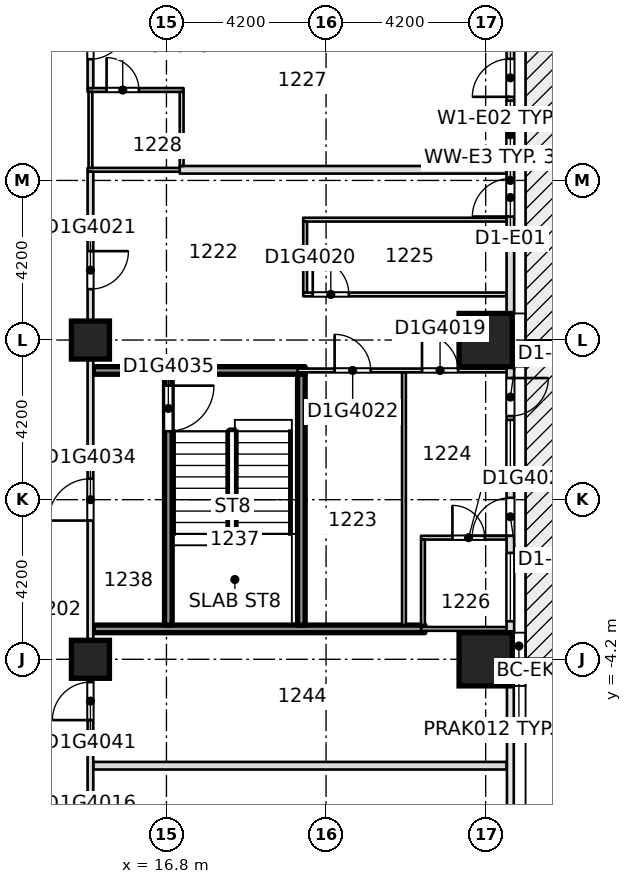
"""IFC4 building model, lengths in metres.
Left out: names, types, materials, properties, quantities, classifications, styles, units other than length and angle.
Written with IfcOpenShell. Run it as: python <this file> out.ifc"""

import sys

from ifc_helpers import new_model, si_unit, direction, frame, frame_2d, origin, origin_2d, place, context, subcontext, project, spatial, rectangle, extrude, element, fill, save


model = new_model("IFC4")
c1 = context("Model", 3, precision=1e-05, world=origin(), true_north=direction((0.0, 1.0)))
c2 = subcontext(c1, "Body", "Model", "MODEL_VIEW")
j1 = project(units=[si_unit("LENGTHUNIT", "METRE"), si_unit("PLANEANGLEUNIT", "RADIAN")], contexts=[c1])
p1 = place(None, origin())
s1 = spatial("IfcSite", under=j1, at=p1, CompositionType="ELEMENT")
p2 = place(p1, origin())
s2 = spatial("IfcBuilding", under=s1, at=p2, CompositionType="ELEMENT")
p3 = place(p2, frame((0.0, 0.0, 55.2)))
s3 = spatial("IfcBuildingStorey", under=s2, at=p3, CompositionType="ELEMENT", Elevation=55.2)
for number, where, z_axis, x_axis in (
    (1, (25.2, -4.2, -0.32), (0.0, 0.0, 1.0), (1.0, 0.0, 0.0)),
    (2, (25.2, 4.2, -0.32), (0.0, 0.0, 1.0), (1.0, 0.0, 0.0)),
):
    element("IfcColumn", number, at=place(p3, frame(where, z_axis=z_axis, x_axis=x_axis)), inside=s3, PredefinedType="COLUMN", context=c2, shape_type="SweptSolid", body=[
        extrude(rectangle(XDim=1.4, YDim=1.4, at=origin_2d()), origin(), (0.0, 0.0, 1.0), 3.45),
    ])
for number, where, z_axis, x_axis in (
    (3, (14.8, -4.2, -0.32), (0.0, 0.0, 1.0), (1.0, 0.0, 0.0)),
    (4, (14.8, 4.2, -0.32), (0.0, 0.0, 1.0), (1.0, 0.0, 0.0)),
):
    element("IfcColumn", number, at=place(p3, frame(where, z_axis=z_axis, x_axis=x_axis)), inside=s3, PredefinedType="COLUMN", context=c2, shape_type="SweptSolid", body=[
        extrude(rectangle(XDim=1.0, YDim=1.0, at=origin_2d()), origin(), (0.0, 0.0, 1.0), 3.45),
    ])
p4 = place(p3, frame((14.875, -7.0, 0.0), z_axis=(0.0, 0.0, 1.0), x_axis=(1.0, 0.0, 0.0)))
e5 = element("IfcWall", 5, at=p4, inside=s3, PredefinedType="PARTITIONING", context=c2, shape_type="SweptSolid", body=[
    extrude(rectangle(XDim=10.875, YDim=0.2, at=frame_2d((5.438, 0.0))), origin(), (0.0, 0.0, 1.0), 3.13),
])
p5 = place(p3, frame((14.875, -3.4, 0.0), z_axis=(0.0, 0.0, 1.0), x_axis=(1.0, 0.0, 0.0)))
e6 = element("IfcWall", 6, at=p5, inside=s3, PredefinedType="SOLIDWALL", context=c2, shape_type="SweptSolid", body=[
    extrude(rectangle(XDim=8.725, YDim=0.2, at=frame_2d((4.363, 0.0))), origin(), (0.0, 0.0, 1.0), 3.13),
])
p6 = place(p3, frame((23.5, -3.4, 0.0), z_axis=(0.0, 0.0, 1.0), x_axis=(1.0, 0.0, 0.0)))
e7 = element("IfcWall", 7, at=p6, inside=s3, PredefinedType="PARTITIONING", context=c2, shape_type="SweptSolid", body=[
    extrude(rectangle(XDim=2.25, YDim=0.1, at=frame_2d((1.125, 0.0))), origin(), (0.0, 0.0, 1.0), 3.13),
])
p7 = place(p3, frame((23.5, -1.0, 0.0), z_axis=(0.0, 0.0, 1.0), x_axis=(1.0, 0.0, 0.0)))
e8 = element("IfcWall", 8, at=p7, inside=s3, PredefinedType="PARTITIONING", context=c2, shape_type="SweptSolid", body=[
    extrude(rectangle(XDim=2.25, YDim=0.1, at=frame_2d((1.125, 0.0))), origin(), (0.0, 0.0, 1.0), 3.13),
])
p8 = place(p7, frame((0.825, 0.0, 0.0)))
e9 = element("IfcOpeningElement", 9, at=p8, cuts=e8, PredefinedType="OPENING", context=c2, shape_type="SweptSolid", body=[
    extrude(rectangle(XDim=0.85, YDim=2.1, at=frame_2d((0.425, 1.05))), frame((0.0, 0.06, 0.0), z_axis=(0.0, -1.0, 0.0), x_axis=(1.0, 0.0, 0.0)), (0.0, 0.0, 1.0), 0.12),
])
p9 = place(p3, frame((14.875, 3.4, 0.0), z_axis=(0.0, 0.0, 1.0), x_axis=(1.0, 0.0, 0.0)))
e10 = element("IfcWall", 10, at=p9, inside=s3, PredefinedType="SOLIDWALL", context=c2, shape_type="SweptSolid", body=[
    extrude(rectangle(XDim=5.575, YDim=0.2, at=frame_2d((2.788, 0.0))), origin(), (0.0, 0.0, 1.0), 3.13),
])
p10 = place(p3, frame((20.25, 3.4, 0.0), z_axis=(0.0, 0.0, 1.0), x_axis=(1.0, 0.0, 0.0)))
e11 = element("IfcWall", 11, at=p10, inside=s3, PredefinedType="PARTITIONING", context=c2, shape_type="SweptSolid", body=[
    extrude(rectangle(XDim=5.5, YDim=0.1, at=frame_2d((2.75, 0.0))), origin(), (0.0, 0.0, 1.0), 3.13),
])
p11 = place(p10, frame((3.275, 0.0, 0.0)))
e12 = element("IfcOpeningElement", 12, at=p11, cuts=e11, PredefinedType="OPENING", context=c2, shape_type="SweptSolid", body=[
    extrude(rectangle(XDim=0.95, YDim=2.1, at=frame_2d((0.475, 1.05))), frame((0.0, 0.06, 0.0), z_axis=(0.0, -1.0, 0.0), x_axis=(1.0, 0.0, 0.0)), (0.0, 0.0, 1.0), 0.12),
])
p12 = place(p10, frame((0.975, 0.0, 0.0)))
e13 = element("IfcOpeningElement", 13, at=p12, cuts=e11, PredefinedType="OPENING", context=c2, shape_type="SweptSolid", body=[
    extrude(rectangle(XDim=0.95, YDim=2.1, at=frame_2d((0.475, 1.05))), frame((0.0, 0.06, 0.0), z_axis=(0.0, -1.0, 0.0), x_axis=(1.0, 0.0, 0.0)), (0.0, 0.0, 1.0), 0.12),
])
p13 = place(p3, frame((20.4, 5.4, 0.0), z_axis=(0.0, 0.0, 1.0), x_axis=(1.0, 0.0, 0.0)))
e14 = element("IfcWall", 14, at=p13, inside=s3, PredefinedType="PARTITIONING", context=c2, shape_type="SweptSolid", body=[
    extrude(rectangle(XDim=5.35, YDim=0.1, at=frame_2d((2.675, 0.0))), origin(), (0.0, 0.0, 1.0), 3.13),
])
p14 = place(p13, frame((0.25, 0.0, 0.0)))
e15 = element("IfcOpeningElement", 15, at=p14, cuts=e14, PredefinedType="OPENING", context=c2, shape_type="SweptSolid", body=[
    extrude(rectangle(XDim=0.95, YDim=2.1, at=frame_2d((0.475, 1.05))), frame((0.0, 0.06, 0.0), z_axis=(0.0, -1.0, 0.0), x_axis=(1.0, 0.0, 0.0)), (0.0, 0.0, 1.0), 0.12),
])
p15 = place(p3, frame((20.4, 7.368, 0.0), z_axis=(0.0, 0.0, 1.0), x_axis=(1.0, 0.0, 0.0)))
e16 = element("IfcWall", 16, at=p15, inside=s3, PredefinedType="PARTITIONING", context=c2, shape_type="SweptSolid", body=[
    extrude(rectangle(XDim=5.35, YDim=0.1, at=frame_2d((2.675, 0.0))), origin(), (0.0, 0.0, 1.0), 3.13),
])
p16 = place(p3, frame((14.725, 8.68, 0.0), z_axis=(0.0, 0.0, 1.0), x_axis=(1.0, 0.0, 0.0)))
e17 = element("IfcWall", 17, at=p16, inside=s3, PredefinedType="PARTITIONING", context=c2, shape_type="SweptSolid", body=[
    extrude(rectangle(XDim=2.525, YDim=0.1, at=frame_2d((1.262, 0.0))), origin(), (0.0, 0.0, 1.0), 3.13),
])
p17 = place(p3, frame((17.15, 8.68, 0.0), z_axis=(0.0, 0.0, 1.0), x_axis=(1.0, 0.0, 0.0)))
e18 = element("IfcWall", 18, at=p17, inside=s3, PredefinedType="PARTITIONING", context=c2, shape_type="SweptSolid", body=[
    extrude(rectangle(XDim=8.6, YDim=0.2, at=frame_2d((4.3, 0.0))), origin(), (0.0, 0.0, 1.0), 3.13),
])
p18 = place(p3, frame((14.725, 10.78, 0.0), z_axis=(0.0, 0.0, 1.0), x_axis=(1.0, 0.0, 0.0)))
e19 = element("IfcWall", 19, at=p18, inside=s3, PredefinedType="PARTITIONING", context=c2, shape_type="SweptSolid", body=[
    extrude(rectangle(XDim=2.525, YDim=0.1, at=frame_2d((1.262, 0.0))), origin(), (0.0, 0.0, 1.0), 3.13),
])
p19 = place(p18, frame((0.5, 0.0, 0.0)))
e20 = element("IfcOpeningElement", 20, at=p19, cuts=e19, PredefinedType="OPENING", context=c2, shape_type="SweptSolid", body=[
    extrude(rectangle(XDim=0.85, YDim=2.1, at=frame_2d((0.425, 1.05))), frame((0.0, 0.06, 0.0), z_axis=(0.0, -1.0, 0.0), x_axis=(1.0, 0.0, 0.0)), (0.0, 0.0, 1.0), 0.12),
])
p20 = place(p3, frame((14.8, -10.525, 0.0), z_axis=(0.0, 0.0, 1.0), x_axis=(0.0, 1.0, 0.0)))
e21 = element("IfcWall", 21, at=p20, inside=s3, PredefinedType="PARTITIONING", context=c2, shape_type="SweptSolid", body=[
    extrude(rectangle(XDim=19.155, YDim=0.15, at=frame_2d((9.577, 0.0))), origin(), (0.0, 0.0, 1.0), 3.13),
])
p21 = place(p20, frame((0.925, 0.0, 0.0)))
e22 = element("IfcOpeningElement", 22, at=p21, cuts=e21, PredefinedType="OPENING", context=c2, shape_type="SweptSolid", body=[
    extrude(rectangle(XDim=1.0, YDim=2.1, at=frame_2d((0.5, 1.05))), frame((0.0, 0.085, 0.0), z_axis=(0.0, -1.0, 0.0), x_axis=(1.0, 0.0, 0.0)), (0.0, 0.0, 1.0), 0.17),
])
p22 = place(p20, frame((16.065, 0.0, 0.0)))
e23 = element("IfcOpeningElement", 23, at=p22, cuts=e21, PredefinedType="OPENING", context=c2, shape_type="SweptSolid", body=[
    extrude(rectangle(XDim=1.0, YDim=2.1, at=frame_2d((0.5, 1.05))), frame((0.0, 0.085, 0.0), z_axis=(0.0, -1.0, 0.0), x_axis=(1.0, 0.0, 0.0)), (0.0, 0.0, 1.0), 0.17),
])
p23 = place(p20, frame((9.975, 0.0, 0.0)))
e24 = element("IfcOpeningElement", 24, at=p23, cuts=e21, PredefinedType="OPENING", context=c2, shape_type="SweptSolid", body=[
    extrude(rectangle(XDim=1.1, YDim=2.1, at=frame_2d((0.55, 1.05))), frame((0.0, 0.085, 0.0), z_axis=(0.0, -1.0, 0.0), x_axis=(1.0, 0.0, 0.0)), (0.0, 0.0, 1.0), 0.17),
])
p24 = place(p20, frame((4.725, 0.0, 0.0)))
e25 = element("IfcOpeningElement", 25, at=p24, cuts=e21, PredefinedType="OPENING", context=c2, shape_type="SweptSolid", body=[
    extrude(rectangle(XDim=1.0, YDim=2.1, at=frame_2d((0.5, 1.05))), frame((0.0, 0.085, 0.0), z_axis=(0.0, -1.0, 0.0), x_axis=(1.0, 0.0, 0.0)), (0.0, 0.0, 1.0), 0.17),
])
p25 = place(p3, frame((14.8, 8.73, 0.0), z_axis=(0.0, 0.0, 1.0), x_axis=(0.0, 1.0, 0.0)))
e26 = element("IfcWall", 26, at=p25, inside=s3, PredefinedType="PARTITIONING", context=c2, shape_type="SweptSolid", body=[
    extrude(rectangle(XDim=2.0, YDim=0.1, at=frame_2d((1.0, 0.0))), origin(), (0.0, 0.0, 1.0), 3.13),
])
p26 = place(p3, frame((14.8, 10.83, 0.0), z_axis=(0.0, 0.0, 1.0), x_axis=(0.0, 1.0, 0.0)))
e27 = element("IfcWall", 27, at=p26, inside=s3, PredefinedType="PARTITIONING", context=c2, shape_type="SweptSolid", body=[
    extrude(rectangle(XDim=2.47, YDim=0.15, at=frame_2d((1.235, 0.0))), origin(), (0.0, 0.0, 1.0), 3.13),
])
p27 = place(p26, frame((0.76, 0.0, 0.0)))
e28 = element("IfcOpeningElement", 28, at=p27, cuts=e27, PredefinedType="OPENING", context=c2, shape_type="SweptSolid", body=[
    extrude(rectangle(XDim=0.95, YDim=2.1, at=frame_2d((0.475, 1.05))), frame((0.0, 0.085, 0.0), z_axis=(0.0, -1.0, 0.0), x_axis=(1.0, 0.0, 0.0)), (0.0, 0.0, 1.0), 0.17),
])
p28 = place(p3, frame((16.85, -3.3, 0.0), z_axis=(0.0, 0.0, 1.0), x_axis=(0.0, 1.0, 0.0)))
e29 = element("IfcWall", 29, at=p28, inside=s3, PredefinedType="SOLIDWALL", context=c2, shape_type="SweptSolid", body=[
    extrude(rectangle(XDim=6.6, YDim=0.2, at=frame_2d((3.3, 0.0))), origin(), (0.0, 0.0, 1.0), 3.13),
])
p29 = place(p28, frame((5.1, 0.0, 0.0)))
e30 = element("IfcOpeningElement", 30, at=p29, cuts=e29, PredefinedType="OPENING", context=c2, shape_type="SweptSolid", body=[
    extrude(rectangle(XDim=1.2, YDim=2.1, at=frame_2d((0.6, 1.05))), frame((0.0, 0.11, 0.0), z_axis=(0.0, -1.0, 0.0), x_axis=(1.0, 0.0, 0.0)), (0.0, 0.0, 1.0), 0.22),
])
p30 = place(p3, frame((17.2, 8.78, 0.0), z_axis=(0.0, 0.0, 1.0), x_axis=(0.0, 1.0, 0.0)))
e31 = element("IfcWall", 31, at=p30, inside=s3, PredefinedType="PARTITIONING", context=c2, shape_type="SweptSolid", body=[
    extrude(rectangle(XDim=1.95, YDim=0.1, at=frame_2d((0.975, 0.0))), origin(), (0.0, 0.0, 1.0), 3.13),
])
p31 = place(p3, frame((20.45, 5.45, 0.0), z_axis=(0.0, 0.0, 1.0), x_axis=(0.0, 1.0, 0.0)))
e32 = element("IfcWall", 32, at=p31, inside=s3, PredefinedType="PARTITIONING", context=c2, shape_type="SweptSolid", body=[
    extrude(rectangle(XDim=1.868, YDim=0.1, at=frame_2d((0.934, 0.0))), origin(), (0.0, 0.0, 1.0), 3.13),
])
p32 = place(p3, frame((23.05, -3.3, 0.0), z_axis=(0.0, 0.0, 1.0), x_axis=(0.0, 1.0, 0.0)))
e33 = element("IfcWall", 33, at=p32, inside=s3, PredefinedType="PARTITIONING", context=c2, shape_type="SweptSolid", body=[
    extrude(rectangle(XDim=6.65, YDim=0.1, at=frame_2d((3.325, 0.0))), origin(), (0.0, 0.0, 1.0), 3.13),
])
p33 = place(p3, frame((23.55, -3.3, 0.0), z_axis=(0.0, 0.0, 1.0), x_axis=(0.0, 1.0, 0.0)))
e34 = element("IfcWall", 34, at=p33, inside=s3, PredefinedType="PARTITIONING", context=c2, shape_type="SweptSolid", body=[
    extrude(rectangle(XDim=2.25, YDim=0.1, at=frame_2d((1.125, 0.0))), origin(), (0.0, 0.0, 1.0), 3.13),
])
p34 = place(p3, frame((25.85, -3.5, 0.0), z_axis=(0.0, 0.0, 1.0), x_axis=(0.0, 1.0, 0.0)))
e35 = element("IfcWall", 35, at=p34, inside=s3, PredefinedType="STANDARD", context=c2, shape_type="SweptSolid", body=[
    extrude(rectangle(XDim=7.0, YDim=0.2, at=frame_2d((3.5, 0.0))), origin(), (0.0, 0.0, 1.0), 3.13),
])
p35 = place(p34, frame((0.3, 0.0, 0.2)))
e36 = element("IfcOpeningElement", 36, at=p35, cuts=e35, PredefinedType="OPENING", context=c2, shape_type="SweptSolid", body=[
    extrude(rectangle(XDim=1.8, YDim=2.65, at=frame_2d((0.9, 1.325))), frame((0.0, 0.11, 0.0), z_axis=(0.0, -1.0, 0.0), x_axis=(1.0, 0.0, 0.0)), (0.0, 0.0, 1.0), 0.22),
])
p36 = place(p34, frame((2.55, 0.0, 0.0)))
e37 = element("IfcOpeningElement", 37, at=p36, cuts=e35, PredefinedType="OPENING", context=c2, shape_type="SweptSolid", body=[
    extrude(rectangle(XDim=1.0, YDim=2.4, at=frame_2d((0.5, 1.2))), frame((0.0, 0.11, 0.0), z_axis=(0.0, -1.0, 0.0), x_axis=(1.0, 0.0, 0.0)), (0.0, 0.0, 1.0), 0.22),
])
p37 = place(p34, frame((3.8, 0.0, 0.2)))
e38 = element("IfcOpeningElement", 38, at=p37, cuts=e35, PredefinedType="OPENING", context=c2, shape_type="SweptSolid", body=[
    extrude(rectangle(XDim=1.8, YDim=2.65, at=frame_2d((0.9, 1.325))), frame((0.0, 0.11, 0.0), z_axis=(0.0, -1.0, 0.0), x_axis=(1.0, 0.0, 0.0)), (0.0, 0.0, 1.0), 0.22),
])
p38 = place(p34, frame((5.7, 0.0, 0.0)))
e39 = element("IfcOpeningElement", 39, at=p38, cuts=e35, PredefinedType="OPENING", context=c2, shape_type="SweptSolid", body=[
    extrude(rectangle(XDim=1.0, YDim=2.4, at=frame_2d((0.5, 1.2))), frame((0.0, 0.11, 0.0), z_axis=(0.0, -1.0, 0.0), x_axis=(1.0, 0.0, 0.0)), (0.0, 0.0, 1.0), 0.22),
])
p39 = place(p3, frame((25.85, 4.9, 0.0), z_axis=(0.0, 0.0, 1.0), x_axis=(0.0, 1.0, 0.0)))
e40 = element("IfcWall", 40, at=p39, inside=s3, PredefinedType="STANDARD", context=c2, shape_type="SweptSolid", body=[
    extrude(rectangle(XDim=7.0, YDim=0.2, at=frame_2d((3.5, 0.0))), origin(), (0.0, 0.0, 1.0), 3.13),
])
p40 = place(p39, frame((2.55, 0.0, 0.0)))
e41 = element("IfcOpeningElement", 41, at=p40, cuts=e40, PredefinedType="OPENING", context=c2, shape_type="SweptSolid", body=[
    extrude(rectangle(XDim=1.0, YDim=2.4, at=frame_2d((0.5, 1.2))), frame((0.0, 0.11, 0.0), z_axis=(0.0, -1.0, 0.0), x_axis=(1.0, 0.0, 0.0)), (0.0, 0.0, 1.0), 0.22),
])
p41 = place(p39, frame((3.8, 0.0, 0.2)))
e42 = element("IfcOpeningElement", 42, at=p41, cuts=e40, PredefinedType="OPENING", context=c2, shape_type="SweptSolid", body=[
    extrude(rectangle(XDim=1.8, YDim=2.65, at=frame_2d((0.9, 1.325))), frame((0.0, 0.11, 0.0), z_axis=(0.0, -1.0, 0.0), x_axis=(1.0, 0.0, 0.0)), (0.0, 0.0, 1.0), 0.22),
])
p42 = place(p39, frame((5.7, 0.0, 0.0)))
e43 = element("IfcOpeningElement", 43, at=p42, cuts=e40, PredefinedType="OPENING", context=c2, shape_type="SweptSolid", body=[
    extrude(rectangle(XDim=1.0, YDim=2.4, at=frame_2d((0.5, 1.2))), frame((0.0, 0.11, 0.0), z_axis=(0.0, -1.0, 0.0), x_axis=(1.0, 0.0, 0.0)), (0.0, 0.0, 1.0), 0.22),
])
p43 = place(p3, frame((20.35, -3.3, 0.0), z_axis=(0.0, 0.0, 1.0), x_axis=(0.0, 1.0, 0.0)))
e44 = element("IfcWall", 44, at=p43, inside=s3, PredefinedType="SOLIDWALL", context=c2, shape_type="SweptSolid", body=[
    extrude(rectangle(XDim=6.6, YDim=0.2, at=frame_2d((3.3, 0.0))), origin(), (0.0, 0.0, 1.0), 3.13),
])
p44 = place(p11, origin())
e45 = element("IfcDoor", 45, at=p44, inside=s3, OperationType="SINGLE_SWING_RIGHT", PredefinedType="DOOR", context=c2, shape_type="SweptSolid", body=[
    extrude(rectangle(XDim=0.95, YDim=2.1, at=frame_2d((0.475, 1.05))), frame((0.0, 0.025, 0.0), z_axis=(0.0, -1.0, 0.0), x_axis=(1.0, 0.0, 0.0)), (0.0, 0.0, 1.0), 0.05),
])
fill(e12, e45)
p45 = place(p14, origin())
e46 = element("IfcDoor", 46, at=p45, inside=s3, OperationType="SINGLE_SWING_LEFT", PredefinedType="DOOR", context=c2, shape_type="SweptSolid", body=[
    extrude(rectangle(XDim=0.95, YDim=2.1, at=frame_2d((0.475, 1.05))), frame((0.0, 0.025, 0.0), z_axis=(0.0, -1.0, 0.0), x_axis=(1.0, 0.0, 0.0)), (0.0, 0.0, 1.0), 0.05),
])
fill(e15, e46)
p46 = place(p22, origin())
e47 = element("IfcDoor", 47, at=p46, inside=s3, OperationType="SINGLE_SWING_RIGHT", PredefinedType="DOOR", context=c2, shape_type="SweptSolid", body=[
    extrude(rectangle(XDim=1.0, YDim=2.1, at=frame_2d((0.5, 1.05))), frame((0.0, 0.025, 0.0), z_axis=(0.0, -1.0, 0.0), x_axis=(1.0, 0.0, 0.0)), (0.0, 0.0, 1.0), 0.05),
])
fill(e23, e47)
p47 = place(p12, origin())
e48 = element("IfcDoor", 48, at=p47, inside=s3, OperationType="SINGLE_SWING_RIGHT", PredefinedType="DOOR", context=c2, shape_type="SweptSolid", body=[
    extrude(rectangle(XDim=0.95, YDim=2.1, at=frame_2d((0.475, 1.05))), frame((0.0, 0.025, 0.0), z_axis=(0.0, -1.0, 0.0), x_axis=(1.0, 0.0, 0.0)), (0.0, 0.0, 1.0), 0.05),
])
fill(e13, e48)
p48 = place(p8, origin())
e49 = element("IfcDoor", 49, at=p48, inside=s3, OperationType="SINGLE_SWING_RIGHT", PredefinedType="DOOR", context=c2, shape_type="SweptSolid", body=[
    extrude(rectangle(XDim=0.85, YDim=2.1, at=frame_2d((0.425, 1.05))), frame((0.0, 0.025, 0.0), z_axis=(0.0, -1.0, 0.0), x_axis=(1.0, 0.0, 0.0)), (0.0, 0.0, 1.0), 0.05),
])
fill(e9, e49)
p49 = place(p27, origin())
e50 = element("IfcDoor", 50, at=p49, inside=s3, OperationType="SINGLE_SWING_RIGHT", PredefinedType="DOOR", context=c2, shape_type="SweptSolid", body=[
    extrude(rectangle(XDim=0.95, YDim=2.1, at=frame_2d((0.475, 1.05))), frame((0.0, 0.025, 0.0), z_axis=(0.0, -1.0, 0.0), x_axis=(1.0, 0.0, 0.0)), (0.0, 0.0, 1.0), 0.05),
])
fill(e28, e50)
p50 = place(p19, origin())
e51 = element("IfcDoor", 51, at=p50, inside=s3, OperationType="SINGLE_SWING_RIGHT", PredefinedType="DOOR", context=c2, shape_type="SweptSolid", body=[
    extrude(rectangle(XDim=0.85, YDim=2.1, at=frame_2d((0.425, 1.05))), frame((0.0, 0.025, 0.0), z_axis=(0.0, -1.0, 0.0), x_axis=(1.0, 0.0, 0.0)), (0.0, 0.0, 1.0), 0.05),
])
fill(e20, e51)
p51 = place(p23, origin())
e52 = element("IfcDoor", 52, at=p51, inside=s3, OperationType="SINGLE_SWING_LEFT", PredefinedType="DOOR", context=c2, shape_type="SweptSolid", body=[
    extrude(rectangle(XDim=1.1, YDim=2.1, at=frame_2d((0.55, 1.05))), frame((0.0, 0.025, 0.0), z_axis=(0.0, -1.0, 0.0), x_axis=(1.0, 0.0, 0.0)), (0.0, 0.0, 1.0), 0.05),
])
fill(e24, e52)
p52 = place(p29, origin())
e53 = element("IfcDoor", 53, at=p52, inside=s3, OperationType="SINGLE_SWING_LEFT", PredefinedType="DOOR", context=c2, shape_type="SweptSolid", body=[
    extrude(rectangle(XDim=1.2, YDim=2.1, at=frame_2d((0.6, 1.05))), frame((0.0, 0.025, 0.0), z_axis=(0.0, -1.0, 0.0), x_axis=(1.0, 0.0, 0.0)), (0.0, 0.0, 1.0), 0.05),
])
fill(e30, e53)
p53 = place(p24, origin())
e54 = element("IfcDoor", 54, at=p53, inside=s3, OperationType="SINGLE_SWING_RIGHT", PredefinedType="DOOR", context=c2, shape_type="SweptSolid", body=[
    extrude(rectangle(XDim=1.0, YDim=2.1, at=frame_2d((0.5, 1.05))), frame((0.0, 0.025, 0.0), z_axis=(0.0, -1.0, 0.0), x_axis=(1.0, 0.0, 0.0)), (0.0, 0.0, 1.0), 0.05),
])
fill(e25, e54)
p54 = place(p35, origin())
e55 = element("IfcWindow", 55, at=p54, inside=s3, PartitioningType="SINGLE_PANEL", PredefinedType="WINDOW", context=c2, shape_type="SweptSolid", body=[
    extrude(rectangle(XDim=1.8, YDim=2.65, at=frame_2d((0.9, 1.325))), frame((0.0, 0.03, 0.0), z_axis=(0.0, -1.0, 0.0), x_axis=(1.0, 0.0, 0.0)), (0.0, 0.0, 1.0), 0.06),
])
fill(e36, e55)
p55 = place(p36, origin())
e56 = element("IfcDoor", 56, at=p55, inside=s3, OperationType="SINGLE_SWING_LEFT", PredefinedType="DOOR", context=c2, shape_type="SweptSolid", body=[
    extrude(rectangle(XDim=1.0, YDim=2.4, at=frame_2d((0.5, 1.2))), frame((0.0, 0.025, 0.0), z_axis=(0.0, -1.0, 0.0), x_axis=(1.0, 0.0, 0.0)), (0.0, 0.0, 1.0), 0.05),
])
fill(e37, e56)
p56 = place(p37, origin())
e57 = element("IfcWindow", 57, at=p56, inside=s3, PartitioningType="SINGLE_PANEL", PredefinedType="WINDOW", context=c2, shape_type="SweptSolid", body=[
    extrude(rectangle(XDim=1.8, YDim=2.65, at=frame_2d((0.9, 1.325))), frame((0.0, 0.03, 0.0), z_axis=(0.0, -1.0, 0.0), x_axis=(1.0, 0.0, 0.0)), (0.0, 0.0, 1.0), 0.06),
])
fill(e38, e57)
p57 = place(p38, origin())
e58 = element("IfcDoor", 58, at=p57, inside=s3, OperationType="SINGLE_SWING_LEFT", PredefinedType="DOOR", context=c2, shape_type="SweptSolid", body=[
    extrude(rectangle(XDim=1.0, YDim=2.4, at=frame_2d((0.5, 1.2))), frame((0.0, 0.025, 0.0), z_axis=(0.0, -1.0, 0.0), x_axis=(1.0, 0.0, 0.0)), (0.0, 0.0, 1.0), 0.05),
])
fill(e39, e58)
p58 = place(p40, origin())
e59 = element("IfcDoor", 59, at=p58, inside=s3, OperationType="SINGLE_SWING_LEFT", PredefinedType="DOOR", context=c2, shape_type="SweptSolid", body=[
    extrude(rectangle(XDim=1.0, YDim=2.4, at=frame_2d((0.5, 1.2))), frame((0.0, 0.025, 0.0), z_axis=(0.0, -1.0, 0.0), x_axis=(1.0, 0.0, 0.0)), (0.0, 0.0, 1.0), 0.05),
])
fill(e41, e59)
p59 = place(p41, origin())
e60 = element("IfcWindow", 60, at=p59, inside=s3, PartitioningType="SINGLE_PANEL", PredefinedType="WINDOW", context=c2, shape_type="SweptSolid", body=[
    extrude(rectangle(XDim=1.8, YDim=2.65, at=frame_2d((0.9, 1.325))), frame((0.0, 0.03, 0.0), z_axis=(0.0, -1.0, 0.0), x_axis=(1.0, 0.0, 0.0)), (0.0, 0.0, 1.0), 0.06),
])
fill(e42, e60)
p60 = place(p42, origin())
e61 = element("IfcDoor", 61, at=p60, inside=s3, OperationType="SINGLE_SWING_LEFT", PredefinedType="DOOR", context=c2, shape_type="SweptSolid", body=[
    extrude(rectangle(XDim=1.0, YDim=2.4, at=frame_2d((0.5, 1.2))), frame((0.0, 0.025, 0.0), z_axis=(0.0, -1.0, 0.0), x_axis=(1.0, 0.0, 0.0)), (0.0, 0.0, 1.0), 0.05),
])
fill(e43, e61)
save(model, sys.argv[1])
